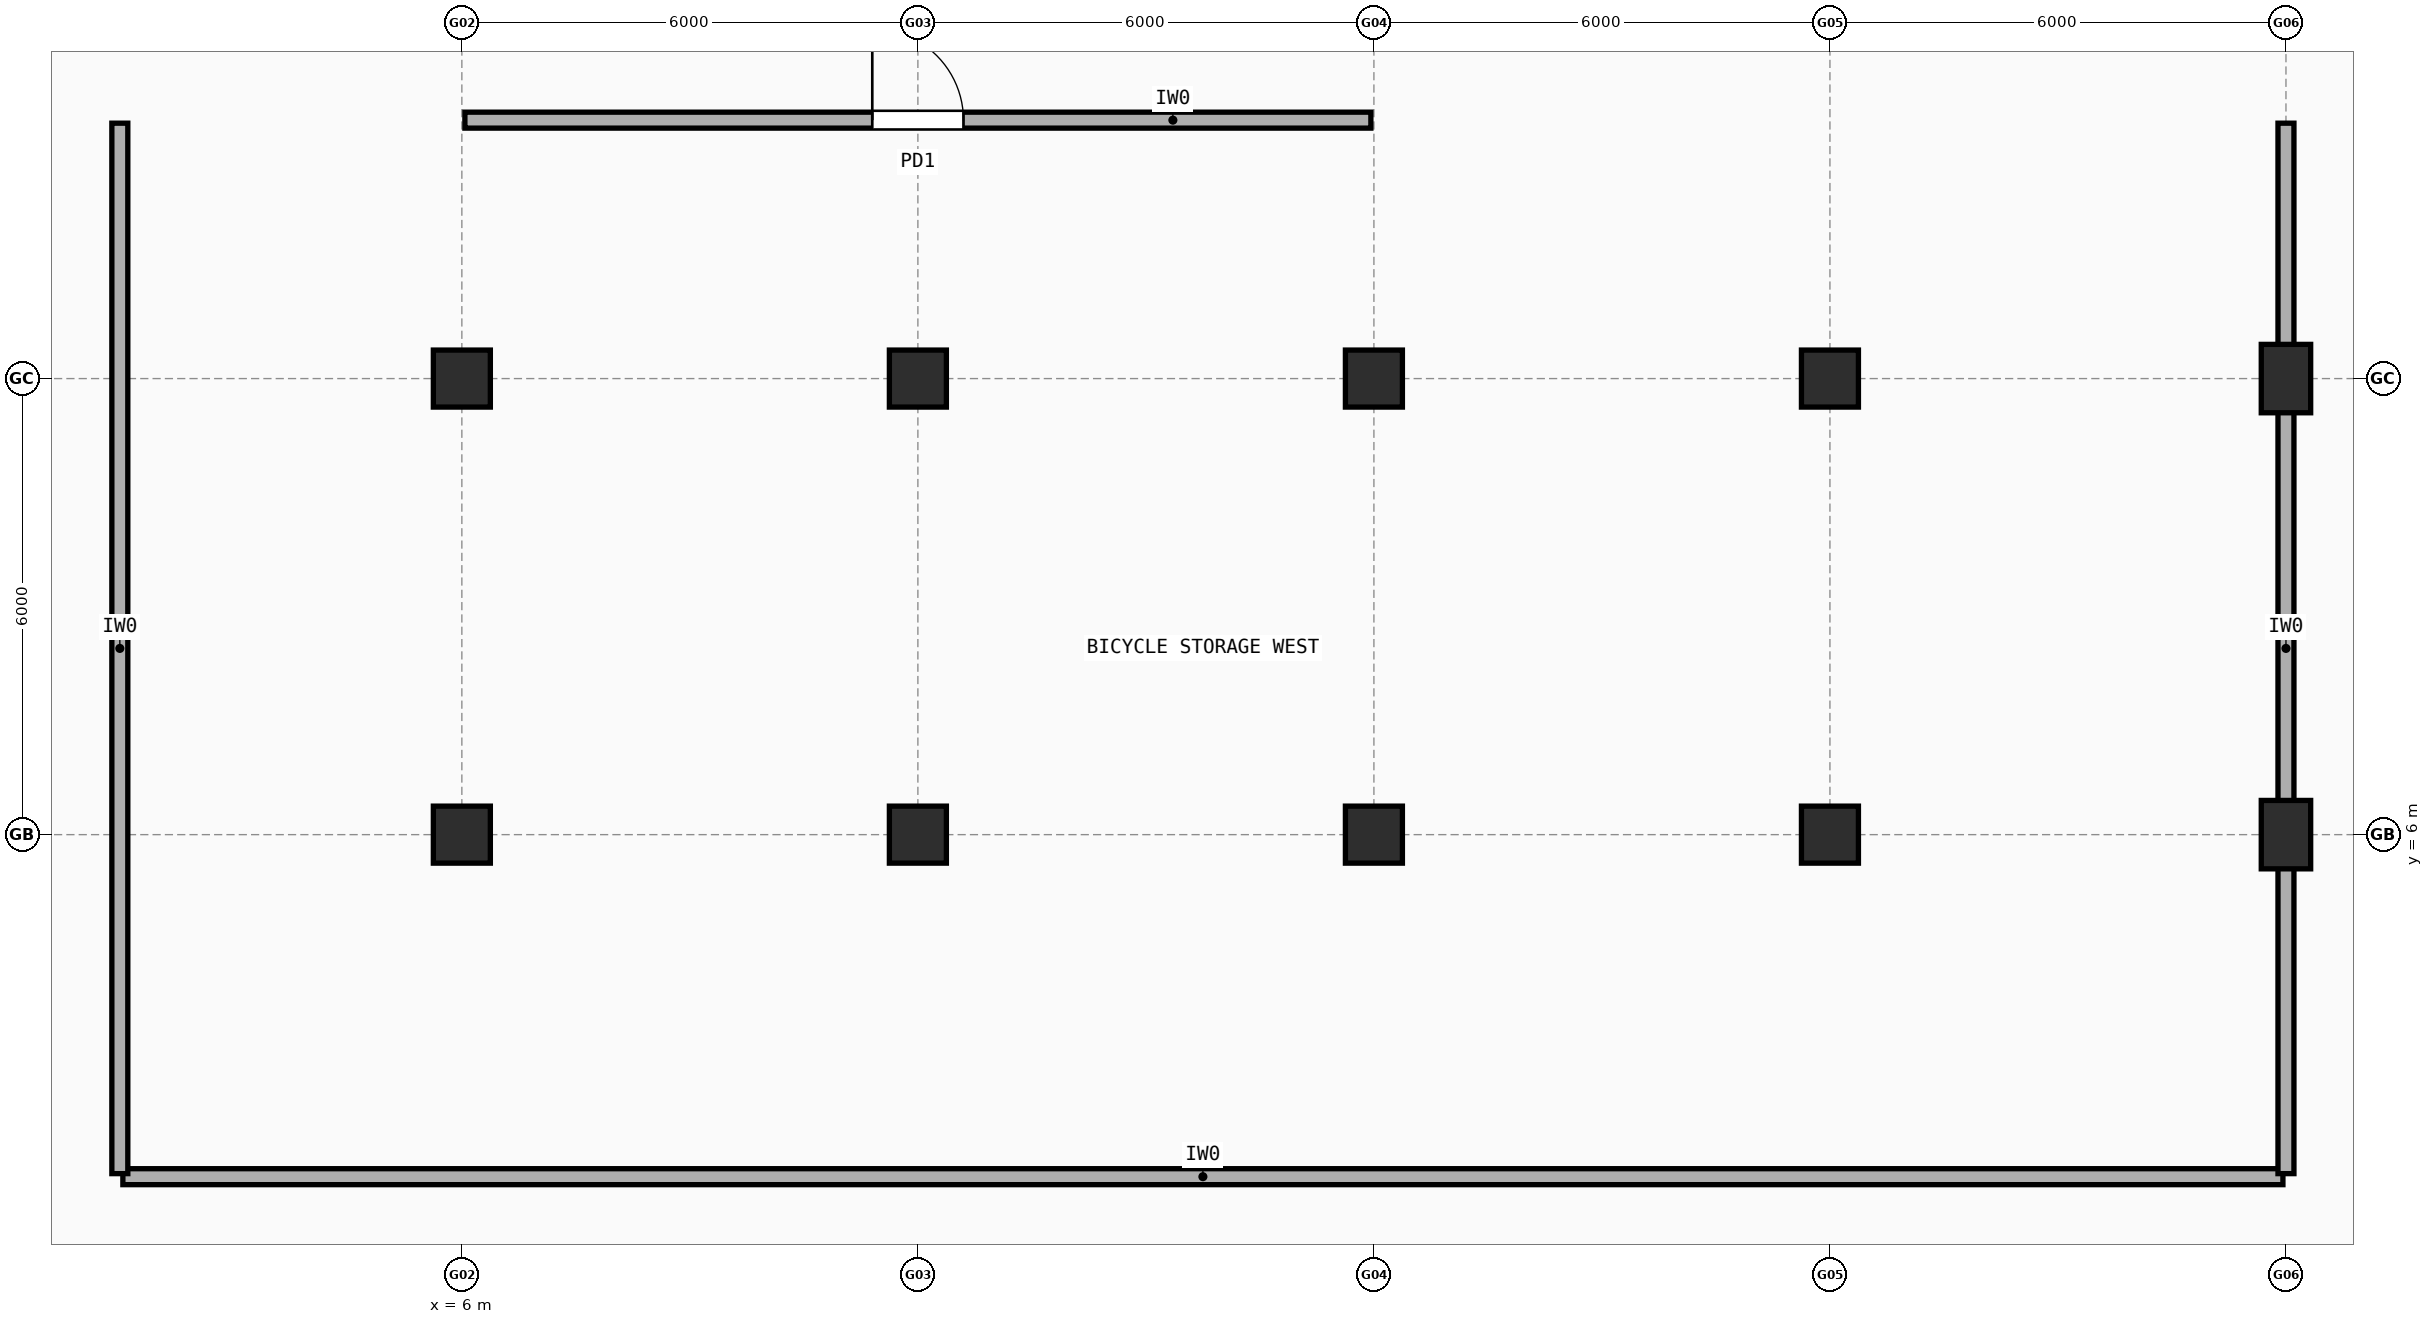
"""IFC4 building model, lengths in metres.
Left out: names, types, materials, properties, quantities, classifications, styles, units other than length and angle.
Written with IfcOpenShell. Run it as: python <this file> out.ifc"""

import sys

from ifc_helpers import new_model, si_unit, direction, frame, frame_2d, origin, origin_2d, place, context, subcontext, project, spatial, rectangle, extrude, element, fill, save


model = new_model("IFC4")
c1 = context("Model", 3, precision=1e-05, world=origin(), true_north=direction((0.0, 1.0)))
c2 = subcontext(c1, "Body", "Model", "MODEL_VIEW")
j1 = project(units=[si_unit("LENGTHUNIT", "METRE"), si_unit("PLANEANGLEUNIT", "RADIAN")], contexts=[c1])
p1 = place(None, origin())
s1 = spatial("IfcSite", under=j1, at=p1, CompositionType="ELEMENT")
p2 = place(p1, origin())
s2 = spatial("IfcBuilding", under=s1, at=p2, CompositionType="ELEMENT")
p3 = place(p2, frame((0.0, 0.0, -4.5)))
s3 = spatial("IfcBuildingStorey", under=s2, at=p3, CompositionType="ELEMENT", Elevation=-4.5)
for number, where, z_axis, x_axis in (
    (1, (6.0, 6.0, 0.0), (0.0, 0.0, 1.0), (1.0, 0.0, 0.0)),
    (2, (6.0, 12.0, 0.0), (0.0, 0.0, 1.0), (1.0, 0.0, 0.0)),
    (3, (12.0, 6.0, 0.0), (0.0, 0.0, 1.0), (1.0, 0.0, 0.0)),
    (4, (12.0, 12.0, 0.0), (0.0, 0.0, 1.0), (1.0, 0.0, 0.0)),
    (5, (18.0, 6.0, 0.0), (0.0, 0.0, 1.0), (1.0, 0.0, 0.0)),
    (6, (18.0, 12.0, 0.0), (0.0, 0.0, 1.0), (1.0, 0.0, 0.0)),
    (7, (24.0, 6.0, 0.0), (0.0, 0.0, 1.0), (1.0, 0.0, 0.0)),
    (8, (24.0, 12.0, 0.0), (0.0, 0.0, 1.0), (1.0, 0.0, 0.0)),
):
    element("IfcColumn", number, at=place(p3, frame(where, z_axis=z_axis, x_axis=x_axis)), inside=s3, PredefinedType="COLUMN", context=c2, shape_type="SweptSolid", body=[
        extrude(rectangle(XDim=0.75, YDim=0.75, at=origin_2d()), origin(), (0.0, 0.0, 1.0), 4.215),
    ])
for number, where, z_axis, x_axis in (
    (9, (30.0, 6.0, 0.0), (0.0, 0.0, 1.0), (1.0, 0.0, 0.0)),
    (10, (30.0, 12.0, 0.0), (0.0, 0.0, 1.0), (1.0, 0.0, 0.0)),
):
    element("IfcColumn", number, at=place(p3, frame(where, z_axis=z_axis, x_axis=x_axis)), inside=s3, PredefinedType="COLUMN", context=c2, shape_type="SweptSolid", body=[
        extrude(rectangle(XDim=0.65, YDim=0.9, at=origin_2d()), origin(), (0.0, 0.0, 1.0), 4.215),
    ])
p4 = place(p3, frame((6.04, 15.4, 0.0), z_axis=(0.0, 0.0, 1.0), x_axis=(1.0, 0.0, 0.0)))
e11 = element("IfcWall", 11, at=p4, inside=s3, PredefinedType="SOLIDWALL", context=c2, shape_type="SweptSolid", body=[
    extrude(rectangle(XDim=11.92, YDim=0.21, at=frame_2d((5.96, 0.0))), origin(), (0.0, 0.0, 1.0), 3.497),
])
p5 = place(p4, frame((5.36, 0.0, 0.0)))
e12 = element("IfcOpeningElement", 12, at=p5, cuts=e11, PredefinedType="OPENING", context=c2, shape_type="SweptSolid", body=[
    extrude(rectangle(XDim=1.2, YDim=2.15, at=frame_2d((0.6, 1.075))), frame((0.0, 0.115, 0.0), z_axis=(0.0, -1.0, 0.0), x_axis=(1.0, 0.0, 0.0)), (0.0, 0.0, 1.0), 0.23),
])
p6 = place(p3, frame((1.54, 1.5, 0.0), z_axis=(0.0, 0.0, 1.0), x_axis=(1.0, 0.0, 0.0)))
e13 = element("IfcWall", 13, at=p6, inside=s3, PredefinedType="SOLIDWALL", context=c2, shape_type="SweptSolid", body=[
    extrude(rectangle(XDim=28.42, YDim=0.21, at=frame_2d((14.21, 0.0))), origin(), (0.0, 0.0, 1.0), 4.215),
])
p7 = place(p3, frame((30.0, 1.54, 0.0), z_axis=(0.0, 0.0, 1.0), x_axis=(0.0, 1.0, 0.0)))
e14 = element("IfcWall", 14, at=p7, inside=s3, PredefinedType="SOLIDWALL", context=c2, shape_type="SweptSolid", body=[
    extrude(rectangle(XDim=13.82, YDim=0.21, at=frame_2d((6.91, 0.0))), origin(), (0.0, 0.0, 1.0), 3.597),
])
p8 = place(p3, frame((1.5, 15.36, 0.0), z_axis=(0.0, 0.0, 1.0), x_axis=(0.0, -1.0, 0.0)))
e15 = element("IfcWall", 15, at=p8, inside=s3, PredefinedType="SOLIDWALL", context=c2, shape_type="SweptSolid", body=[
    extrude(rectangle(XDim=13.82, YDim=0.21, at=frame_2d((6.91, 0.0))), origin(), (0.0, 0.0, 1.0), 3.497),
])
p9 = place(p5, origin())
e16 = element("IfcDoor", 16, at=p9, inside=s3, OperationType="SINGLE_SWING_LEFT", PredefinedType="DOOR", context=c2, shape_type="SweptSolid", body=[
    extrude(rectangle(XDim=1.2, YDim=2.15, at=frame_2d((0.6, 1.075))), frame((0.0, 0.025, 0.0), z_axis=(0.0, -1.0, 0.0), x_axis=(1.0, 0.0, 0.0)), (0.0, 0.0, 1.0), 0.05),
])
fill(e12, e16)
save(model, sys.argv[1])
